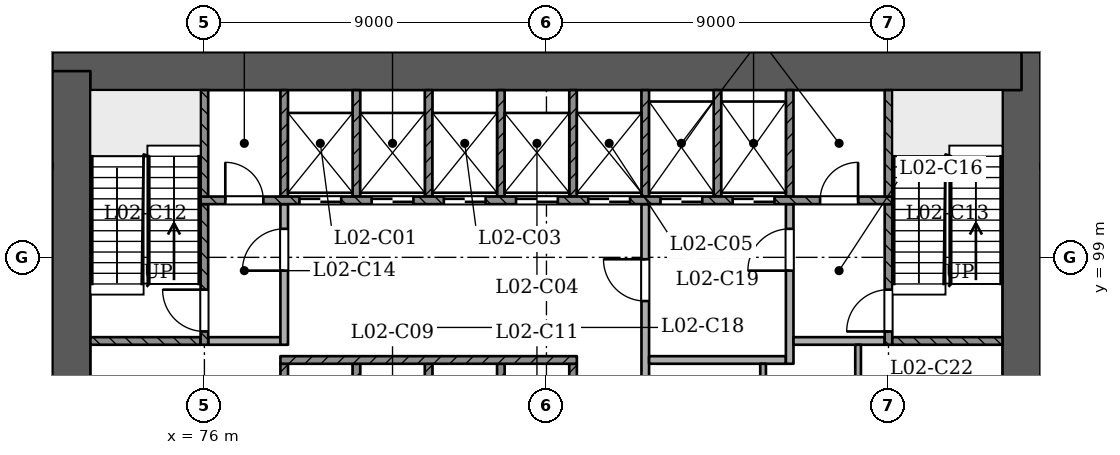
"""IFC4 building model, lengths in metres.
Left out: names, types, materials, properties, quantities, classifications, styles, units other than length and angle.
Written with IfcOpenShell. Run it as: python <this file> out.ifc"""

import sys

from ifc_helpers import new_model, si_unit, direction, frame, frame_2d, origin, place, context, subcontext, project, spatial, rectangle, extrude, element, fill, save


model = new_model("IFC4")
c1 = context("Model", 3, precision=1e-05, world=origin(), true_north=direction((0.0, 1.0)))
c2 = subcontext(c1, "Body", "Model", "MODEL_VIEW")
j1 = project(units=[si_unit("LENGTHUNIT", "METRE"), si_unit("PLANEANGLEUNIT", "RADIAN")], contexts=[c1])
p1 = place(None, origin())
s1 = spatial("IfcSite", under=j1, at=p1, CompositionType="ELEMENT")
p2 = place(p1, origin())
s2 = spatial("IfcBuilding", under=s1, at=p2, CompositionType="ELEMENT")
p3 = place(p2, frame((0.0, 0.0, 13.5)))
s3 = spatial("IfcBuildingStorey", under=s2, at=p3, CompositionType="ELEMENT", Elevation=13.5)
p4 = place(p3, frame((97.5, 92.9, 0.0), z_axis=(0.0, 0.0, 1.0), x_axis=(0.0, 1.0, 0.0)))
e1 = element("IfcWall", 1, at=p4, inside=s3, PredefinedType="SHEAR", context=c2, shape_type="SweptSolid", body=[
    extrude(rectangle(XDim=11.5, YDim=1.0, at=frame_2d((5.75, 0.0))), origin(), (0.0, 0.0, 1.0), 4.5),
])
p5 = place(p3, frame((97.5, 103.9, 0.0), z_axis=(0.0, 0.0, 1.0), x_axis=(-1.0, 0.0, 0.0)))
e2 = element("IfcWall", 2, at=p5, inside=s3, PredefinedType="SHEAR", context=c2, shape_type="SweptSolid", body=[
    extrude(rectangle(XDim=25.5, YDim=1.0, at=frame_2d((12.75, 0.0))), origin(), (0.0, 0.0, 1.0), 4.5),
])
p6 = place(p3, frame((72.5, 103.9, 0.0), z_axis=(0.0, 0.0, 1.0), x_axis=(0.0, -1.0, 0.0)))
e3 = element("IfcWall", 3, at=p6, inside=s3, PredefinedType="SHEAR", context=c2, shape_type="SweptSolid", body=[
    extrude(rectangle(XDim=11.5, YDim=1.0, at=frame_2d((5.75, 0.0))), origin(), (0.0, 0.0, 1.0), 4.5),
])
for number, where, z_axis, x_axis in (
    (4, (78.1, 93.4, 0.0), (0.0, 0.0, 1.0), (0.0, 1.0, 0.0)),
    (5, (80.0, 93.4, 0.0), (0.0, 0.0, 1.0), (0.0, 1.0, 0.0)),
    (6, (81.9, 93.4, 0.0), (0.0, 0.0, 1.0), (0.0, 1.0, 0.0)),
    (7, (83.8, 93.4, 0.0), (0.0, 0.0, 1.0), (0.0, 1.0, 0.0)),
    (8, (85.7, 93.4, 0.0), (0.0, 0.0, 1.0), (0.0, 1.0, 0.0)),
):
    element("IfcWall", number, at=place(p3, frame(where, z_axis=z_axis, x_axis=x_axis)), inside=s3, PredefinedType="SOLIDWALL", context=c2, shape_type="SweptSolid", body=[
        extrude(rectangle(XDim=2.8, YDim=0.2, at=frame_2d((1.4, 0.0))), origin(), (0.0, 0.0, 1.0), 4.05),
    ])
p7 = place(p3, frame((87.6, 93.4, 0.0), z_axis=(0.0, 0.0, 1.0), x_axis=(0.0, 1.0, 0.0)))
e9 = element("IfcWall", 9, at=p7, inside=s3, PredefinedType="PARTITIONING", context=c2, shape_type="SweptSolid", body=[
    extrude(rectangle(XDim=7.0, YDim=0.2, at=frame_2d((3.5, 0.0))), origin(), (0.0, 0.0, 1.0), 4.05),
])
p8 = place(p7, frame((4.45, 0.0, 0.0)))
e10 = element("IfcOpeningElement", 10, at=p8, cuts=e9, PredefinedType="OPENING", context=c2, shape_type="SweptSolid", body=[
    extrude(rectangle(XDim=1.1, YDim=2.1, at=frame_2d((0.55, 1.05))), frame((0.0, 0.11, 0.0), z_axis=(0.0, -1.0, 0.0), x_axis=(1.0, 0.0, 0.0)), (0.0, 0.0, 1.0), 0.221),
])
p9 = place(p3, frame((90.7, 93.4, 0.0), z_axis=(0.0, 0.0, 1.0), x_axis=(0.0, 1.0, 0.0)))
e11 = element("IfcWall", 11, at=p9, inside=s3, PredefinedType="PARTITIONING", context=c2, shape_type="SweptSolid", body=[
    extrude(rectangle(XDim=2.8, YDim=0.15, at=frame_2d((1.4, 0.0))), origin(), (0.0, 0.0, 1.0), 4.05),
])
p10 = place(p3, frame((93.2, 93.4, 0.0), z_axis=(0.0, 0.0, 1.0), x_axis=(0.0, 1.0, 0.0)))
e12 = element("IfcWall", 12, at=p10, inside=s3, PredefinedType="PARTITIONING", context=c2, shape_type="SweptSolid", body=[
    extrude(rectangle(XDim=3.3, YDim=0.15, at=frame_2d((1.65, 0.0))), origin(), (0.0, 0.0, 1.0), 4.05),
])
p11 = place(p3, frame((78.0, 96.3, 0.0), z_axis=(0.0, 0.0, 1.0), x_axis=(1.0, 0.0, 0.0)))
e13 = element("IfcWall", 13, at=p11, inside=s3, PredefinedType="SOLIDWALL", context=c2, shape_type="SweptSolid", body=[
    extrude(rectangle(XDim=7.8, YDim=0.2, at=frame_2d((3.9, 0.0))), origin(), (0.0, 0.0, 1.0), 4.05),
])
p12 = place(p3, frame((87.7, 96.3, 0.0), z_axis=(0.0, 0.0, 1.0), x_axis=(1.0, 0.0, 0.0)))
e14 = element("IfcWall", 14, at=p12, inside=s3, PredefinedType="PARTITIONING", context=c2, shape_type="SweptSolid", body=[
    extrude(rectangle(XDim=3.6, YDim=0.2, at=frame_2d((1.8, 0.0))), origin(), (0.0, 0.0, 1.0), 4.05),
])
p13 = place(p3, frame((91.4, 96.2, 0.0), z_axis=(0.0, 0.0, 1.0), x_axis=(0.0, 1.0, 0.0)))
e15 = element("IfcWall", 15, at=p13, inside=s3, PredefinedType="PARTITIONING", context=c2, shape_type="SweptSolid", body=[
    extrude(rectangle(XDim=4.2, YDim=0.2, at=frame_2d((2.1, 0.0))), origin(), (0.0, 0.0, 1.0), 4.05),
])
p14 = place(p13, frame((2.45, 0.0, 0.0)))
e16 = element("IfcOpeningElement", 16, at=p14, cuts=e15, PredefinedType="OPENING", context=c2, shape_type="SweptSolid", body=[
    extrude(rectangle(XDim=1.1, YDim=2.1, at=frame_2d((0.55, 1.05))), frame((0.0, 0.11, 0.0), z_axis=(0.0, -1.0, 0.0), x_axis=(1.0, 0.0, 0.0)), (0.0, 0.0, 1.0), 0.221),
])
p15 = place(p3, frame((73.0, 96.8, 0.0), z_axis=(0.0, 0.0, 1.0), x_axis=(1.0, 0.0, 0.0)))
e17 = element("IfcWall", 17, at=p15, inside=s3, PredefinedType="SOLIDWALL", context=c2, shape_type="SweptSolid", body=[
    extrude(rectangle(XDim=2.9, YDim=0.2, at=frame_2d((1.45, 0.0))), origin(), (0.0, 0.0, 1.0), 4.05),
])
p16 = place(p3, frame((76.0, 96.7, 0.0), z_axis=(0.0, 0.0, 1.0), x_axis=(0.0, 1.0, 0.0)))
e18 = element("IfcWall", 18, at=p16, inside=s3, PredefinedType="SOLIDWALL", context=c2, shape_type="SweptSolid", body=[
    extrude(rectangle(XDim=3.7, YDim=0.2, at=frame_2d((1.85, 0.0))), origin(), (0.0, 0.0, 1.0), 4.05),
])
p17 = place(p16, frame((0.35, 0.0, 0.0)))
e19 = element("IfcOpeningElement", 19, at=p17, cuts=e18, PredefinedType="OPENING", context=c2, shape_type="SweptSolid", body=[
    extrude(rectangle(XDim=1.1, YDim=2.1, at=frame_2d((0.55, 1.05))), frame((0.0, 0.11, 0.0), z_axis=(0.0, -1.0, 0.0), x_axis=(1.0, 0.0, 0.0)), (0.0, 0.0, 1.0), 0.221),
])
p18 = place(p3, frame((76.1, 96.8, 0.0), z_axis=(0.0, 0.0, 1.0), x_axis=(1.0, 0.0, 0.0)))
e20 = element("IfcWall", 20, at=p18, inside=s3, PredefinedType="PARTITIONING", context=c2, shape_type="SweptSolid", body=[
    extrude(rectangle(XDim=1.9, YDim=0.2, at=frame_2d((0.95, 0.0))), origin(), (0.0, 0.0, 1.0), 4.05),
])
p19 = place(p3, frame((78.1, 96.7, 0.0), z_axis=(0.0, 0.0, 1.0), x_axis=(0.0, 1.0, 0.0)))
e21 = element("IfcWall", 21, at=p19, inside=s3, PredefinedType="PARTITIONING", context=c2, shape_type="SweptSolid", body=[
    extrude(rectangle(XDim=3.7, YDim=0.2, at=frame_2d((1.85, 0.0))), origin(), (0.0, 0.0, 1.0), 4.05),
])
p20 = place(p19, frame((1.95, 0.0, 0.0)))
e22 = element("IfcOpeningElement", 22, at=p20, cuts=e21, PredefinedType="OPENING", context=c2, shape_type="SweptSolid", body=[
    extrude(rectangle(XDim=1.1, YDim=2.1, at=frame_2d((0.55, 1.05))), frame((0.0, 0.11, 0.0), z_axis=(0.0, -1.0, 0.0), x_axis=(1.0, 0.0, 0.0)), (0.0, 0.0, 1.0), 0.221),
])
p21 = place(p3, frame((91.5, 96.8, 0.0), z_axis=(0.0, 0.0, 1.0), x_axis=(1.0, 0.0, 0.0)))
e23 = element("IfcWall", 23, at=p21, inside=s3, PredefinedType="PARTITIONING", context=c2, shape_type="SweptSolid", body=[
    extrude(rectangle(XDim=2.4, YDim=0.2, at=frame_2d((1.2, 0.0))), origin(), (0.0, 0.0, 1.0), 4.05),
])
p22 = place(p3, frame((94.0, 96.7, 0.0), z_axis=(0.0, 0.0, 1.0), x_axis=(0.0, 1.0, 0.0)))
e24 = element("IfcWall", 24, at=p22, inside=s3, PredefinedType="SOLIDWALL", context=c2, shape_type="SweptSolid", body=[
    extrude(rectangle(XDim=3.7, YDim=0.2, at=frame_2d((1.85, 0.0))), origin(), (0.0, 0.0, 1.0), 4.05),
])
p23 = place(p22, frame((0.35, 0.0, 0.0)))
e25 = element("IfcOpeningElement", 25, at=p23, cuts=e24, PredefinedType="OPENING", context=c2, shape_type="SweptSolid", body=[
    extrude(rectangle(XDim=1.1, YDim=2.1, at=frame_2d((0.55, 1.05))), frame((0.0, 0.11, 0.0), z_axis=(0.0, -1.0, 0.0), x_axis=(1.0, 0.0, 0.0)), (0.0, 0.0, 1.0), 0.221),
])
p24 = place(p3, frame((94.1, 96.8, 0.0), z_axis=(0.0, 0.0, 1.0), x_axis=(1.0, 0.0, 0.0)))
e26 = element("IfcWall", 26, at=p24, inside=s3, PredefinedType="SOLIDWALL", context=c2, shape_type="SweptSolid", body=[
    extrude(rectangle(XDim=2.9, YDim=0.2, at=frame_2d((1.45, 0.0))), origin(), (0.0, 0.0, 1.0), 4.05),
])
p25 = place(p3, frame((75.9, 100.5, 0.0), z_axis=(0.0, 0.0, 1.0), x_axis=(1.0, 0.0, 0.0)))
e27 = element("IfcWall", 27, at=p25, inside=s3, PredefinedType="SOLIDWALL", context=c2, shape_type="SweptSolid", body=[
    extrude(rectangle(XDim=18.2, YDim=0.2, at=frame_2d((9.1, 0.0))), origin(), (0.0, 0.0, 1.0), 4.05),
])
p26 = place(p25, frame((2.6, 0.0, 0.0)))
e28 = element("IfcOpeningElement", 28, at=p26, cuts=e27, PredefinedType="OPENING", context=c2, shape_type="SweptSolid", body=[
    extrude(rectangle(XDim=1.1, YDim=2.1, at=frame_2d((0.55, 1.05))), frame((0.0, 0.11, 0.0), z_axis=(0.0, -1.0, 0.0), x_axis=(1.0, 0.0, 0.0)), (0.0, 0.0, 1.0), 0.221),
])
p27 = place(p25, frame((4.5, 0.0, 0.0)))
e29 = element("IfcOpeningElement", 29, at=p27, cuts=e27, PredefinedType="OPENING", context=c2, shape_type="SweptSolid", body=[
    extrude(rectangle(XDim=1.1, YDim=2.1, at=frame_2d((0.55, 1.05))), frame((0.0, 0.11, 0.0), z_axis=(0.0, -1.0, 0.0), x_axis=(1.0, 0.0, 0.0)), (0.0, 0.0, 1.0), 0.221),
])
p28 = place(p25, frame((6.4, 0.0, 0.0)))
e30 = element("IfcOpeningElement", 30, at=p28, cuts=e27, PredefinedType="OPENING", context=c2, shape_type="SweptSolid", body=[
    extrude(rectangle(XDim=1.1, YDim=2.1, at=frame_2d((0.55, 1.05))), frame((0.0, 0.11, 0.0), z_axis=(0.0, -1.0, 0.0), x_axis=(1.0, 0.0, 0.0)), (0.0, 0.0, 1.0), 0.221),
])
p29 = place(p25, frame((8.3, 0.0, 0.0)))
e31 = element("IfcOpeningElement", 31, at=p29, cuts=e27, PredefinedType="OPENING", context=c2, shape_type="SweptSolid", body=[
    extrude(rectangle(XDim=1.1, YDim=2.1, at=frame_2d((0.55, 1.05))), frame((0.0, 0.11, 0.0), z_axis=(0.0, -1.0, 0.0), x_axis=(1.0, 0.0, 0.0)), (0.0, 0.0, 1.0), 0.221),
])
p30 = place(p25, frame((10.2, 0.0, 0.0)))
e32 = element("IfcOpeningElement", 32, at=p30, cuts=e27, PredefinedType="OPENING", context=c2, shape_type="SweptSolid", body=[
    extrude(rectangle(XDim=1.1, YDim=2.1, at=frame_2d((0.55, 1.05))), frame((0.0, 0.11, 0.0), z_axis=(0.0, -1.0, 0.0), x_axis=(1.0, 0.0, 0.0)), (0.0, 0.0, 1.0), 0.221),
])
p31 = place(p25, frame((12.1, 0.0, 0.0)))
e33 = element("IfcOpeningElement", 33, at=p31, cuts=e27, PredefinedType="OPENING", context=c2, shape_type="SweptSolid", body=[
    extrude(rectangle(XDim=1.1, YDim=2.1, at=frame_2d((0.55, 1.05))), frame((0.0, 0.11, 0.0), z_axis=(0.0, -1.0, 0.0), x_axis=(1.0, 0.0, 0.0)), (0.0, 0.0, 1.0), 0.221),
])
p32 = place(p25, frame((14.0, 0.0, 0.0)))
e34 = element("IfcOpeningElement", 34, at=p32, cuts=e27, PredefinedType="OPENING", context=c2, shape_type="SweptSolid", body=[
    extrude(rectangle(XDim=1.1, YDim=2.1, at=frame_2d((0.55, 1.05))), frame((0.0, 0.11, 0.0), z_axis=(0.0, -1.0, 0.0), x_axis=(1.0, 0.0, 0.0)), (0.0, 0.0, 1.0), 0.221),
])
p33 = place(p25, frame((0.65, 0.0, 0.0)))
e35 = element("IfcOpeningElement", 35, at=p33, cuts=e27, PredefinedType="OPENING", context=c2, shape_type="SweptSolid", body=[
    extrude(rectangle(XDim=1.0, YDim=2.1, at=frame_2d((0.5, 1.05))), frame((0.0, 0.11, 0.0), z_axis=(0.0, -1.0, 0.0), x_axis=(1.0, 0.0, 0.0)), (0.0, 0.0, 1.0), 0.221),
])
p34 = place(p25, frame((16.3, 0.0, 0.0)))
e36 = element("IfcOpeningElement", 36, at=p34, cuts=e27, PredefinedType="OPENING", context=c2, shape_type="SweptSolid", body=[
    extrude(rectangle(XDim=1.0, YDim=2.1, at=frame_2d((0.5, 1.05))), frame((0.0, 0.11, 0.0), z_axis=(0.0, -1.0, 0.0), x_axis=(1.0, 0.0, 0.0)), (0.0, 0.0, 1.0), 0.221),
])
for number, where, z_axis, x_axis in (
    (37, (76.0, 100.6, 0.0), (0.0, 0.0, 1.0), (0.0, 1.0, 0.0)),
    (38, (78.1, 100.6, 0.0), (0.0, 0.0, 1.0), (0.0, 1.0, 0.0)),
    (39, (80.0, 100.6, 0.0), (0.0, 0.0, 1.0), (0.0, 1.0, 0.0)),
    (40, (81.9, 100.6, 0.0), (0.0, 0.0, 1.0), (0.0, 1.0, 0.0)),
    (41, (83.8, 100.6, 0.0), (0.0, 0.0, 1.0), (0.0, 1.0, 0.0)),
    (42, (85.7, 100.6, 0.0), (0.0, 0.0, 1.0), (0.0, 1.0, 0.0)),
    (43, (87.6, 100.6, 0.0), (0.0, 0.0, 1.0), (0.0, 1.0, 0.0)),
    (44, (89.5, 100.6, 0.0), (0.0, 0.0, 1.0), (0.0, 1.0, 0.0)),
    (45, (91.4, 100.6, 0.0), (0.0, 0.0, 1.0), (0.0, 1.0, 0.0)),
    (46, (94.0, 100.6, 0.0), (0.0, 0.0, 1.0), (0.0, 1.0, 0.0)),
):
    element("IfcWall", number, at=place(p3, frame(where, z_axis=z_axis, x_axis=x_axis)), inside=s3, PredefinedType="SOLIDWALL", context=c2, shape_type="SweptSolid", body=[
        extrude(rectangle(XDim=2.8, YDim=0.2, at=frame_2d((1.4, 0.0))), origin(), (0.0, 0.0, 1.0), 4.05),
    ])
p35 = place(p26, origin())
e47 = element("IfcDoor", 47, at=p35, inside=s3, OperationType="SLIDING_TO_RIGHT", PredefinedType="NOTDEFINED", context=c2, shape_type="SweptSolid", body=[
    extrude(rectangle(XDim=1.1, YDim=2.1, at=frame_2d((0.55, 1.05))), frame((0.0, 0.025, 0.0), z_axis=(0.0, -1.0, 0.0), x_axis=(1.0, 0.0, 0.0)), (0.0, 0.0, 1.0), 0.05),
])
fill(e28, e47)
p36 = place(p27, origin())
e48 = element("IfcDoor", 48, at=p36, inside=s3, OperationType="SLIDING_TO_LEFT", PredefinedType="NOTDEFINED", context=c2, shape_type="SweptSolid", body=[
    extrude(rectangle(XDim=1.1, YDim=2.1, at=frame_2d((0.55, 1.05))), frame((0.0, 0.025, 0.0), z_axis=(0.0, -1.0, 0.0), x_axis=(1.0, 0.0, 0.0)), (0.0, 0.0, 1.0), 0.05),
])
fill(e29, e48)
p37 = place(p28, origin())
e49 = element("IfcDoor", 49, at=p37, inside=s3, OperationType="SLIDING_TO_RIGHT", PredefinedType="NOTDEFINED", context=c2, shape_type="SweptSolid", body=[
    extrude(rectangle(XDim=1.1, YDim=2.1, at=frame_2d((0.55, 1.05))), frame((0.0, 0.025, 0.0), z_axis=(0.0, -1.0, 0.0), x_axis=(1.0, 0.0, 0.0)), (0.0, 0.0, 1.0), 0.05),
])
fill(e30, e49)
p38 = place(p29, origin())
e50 = element("IfcDoor", 50, at=p38, inside=s3, OperationType="SLIDING_TO_LEFT", PredefinedType="NOTDEFINED", context=c2, shape_type="SweptSolid", body=[
    extrude(rectangle(XDim=1.1, YDim=2.1, at=frame_2d((0.55, 1.05))), frame((0.0, 0.025, 0.0), z_axis=(0.0, -1.0, 0.0), x_axis=(1.0, 0.0, 0.0)), (0.0, 0.0, 1.0), 0.05),
])
fill(e31, e50)
p39 = place(p30, origin())
e51 = element("IfcDoor", 51, at=p39, inside=s3, OperationType="SLIDING_TO_RIGHT", PredefinedType="NOTDEFINED", context=c2, shape_type="SweptSolid", body=[
    extrude(rectangle(XDim=1.1, YDim=2.1, at=frame_2d((0.55, 1.05))), frame((0.0, 0.025, 0.0), z_axis=(0.0, -1.0, 0.0), x_axis=(1.0, 0.0, 0.0)), (0.0, 0.0, 1.0), 0.05),
])
fill(e32, e51)
p40 = place(p31, origin())
e52 = element("IfcDoor", 52, at=p40, inside=s3, OperationType="SLIDING_TO_RIGHT", PredefinedType="NOTDEFINED", context=c2, shape_type="SweptSolid", body=[
    extrude(rectangle(XDim=1.1, YDim=2.1, at=frame_2d((0.55, 1.05))), frame((0.0, 0.025, 0.0), z_axis=(0.0, -1.0, 0.0), x_axis=(1.0, 0.0, 0.0)), (0.0, 0.0, 1.0), 0.05),
])
fill(e33, e52)
p41 = place(p32, origin())
e53 = element("IfcDoor", 53, at=p41, inside=s3, OperationType="SLIDING_TO_LEFT", PredefinedType="NOTDEFINED", context=c2, shape_type="SweptSolid", body=[
    extrude(rectangle(XDim=1.1, YDim=2.1, at=frame_2d((0.55, 1.05))), frame((0.0, 0.025, 0.0), z_axis=(0.0, -1.0, 0.0), x_axis=(1.0, 0.0, 0.0)), (0.0, 0.0, 1.0), 0.05),
])
fill(e34, e53)
p42 = place(p17, origin())
e54 = element("IfcDoor", 54, at=p42, inside=s3, OperationType="SINGLE_SWING_RIGHT", PredefinedType="NOTDEFINED", context=c2, shape_type="SweptSolid", body=[
    extrude(rectangle(XDim=1.1, YDim=2.1, at=frame_2d((0.55, 1.05))), frame((0.0, 0.025, 0.0), z_axis=(0.0, -1.0, 0.0), x_axis=(1.0, 0.0, 0.0)), (0.0, 0.0, 1.0), 0.05),
])
fill(e19, e54)
p43 = place(p23, origin())
e55 = element("IfcDoor", 55, at=p43, inside=s3, OperationType="SINGLE_SWING_LEFT", PredefinedType="NOTDEFINED", context=c2, shape_type="SweptSolid", body=[
    extrude(rectangle(XDim=1.1, YDim=2.1, at=frame_2d((0.55, 1.05))), frame((0.0, 0.025, 0.0), z_axis=(0.0, -1.0, 0.0), x_axis=(1.0, 0.0, 0.0)), (0.0, 0.0, 1.0), 0.05),
])
fill(e25, e55)
p44 = place(p20, origin())
e56 = element("IfcDoor", 56, at=p44, inside=s3, OperationType="SINGLE_SWING_LEFT", PredefinedType="NOTDEFINED", context=c2, shape_type="SweptSolid", body=[
    extrude(rectangle(XDim=1.1, YDim=2.1, at=frame_2d((0.55, 1.05))), frame((0.0, 0.025, 0.0), z_axis=(0.0, -1.0, 0.0), x_axis=(1.0, 0.0, 0.0)), (0.0, 0.0, 1.0), 0.05),
])
fill(e22, e56)
p45 = place(p8, origin())
e57 = element("IfcDoor", 57, at=p45, inside=s3, OperationType="SINGLE_SWING_RIGHT", PredefinedType="NOTDEFINED", context=c2, shape_type="SweptSolid", body=[
    extrude(rectangle(XDim=1.1, YDim=2.1, at=frame_2d((0.55, 1.05))), frame((0.0, 0.025, 0.0), z_axis=(0.0, -1.0, 0.0), x_axis=(1.0, 0.0, 0.0)), (0.0, 0.0, 1.0), 0.05),
])
fill(e10, e57)
p46 = place(p14, origin())
e58 = element("IfcDoor", 58, at=p46, inside=s3, OperationType="SINGLE_SWING_LEFT", PredefinedType="NOTDEFINED", context=c2, shape_type="SweptSolid", body=[
    extrude(rectangle(XDim=1.1, YDim=2.1, at=frame_2d((0.55, 1.05))), frame((0.0, 0.025, 0.0), z_axis=(0.0, -1.0, 0.0), x_axis=(1.0, 0.0, 0.0)), (0.0, 0.0, 1.0), 0.05),
])
fill(e16, e58)
p47 = place(p33, origin())
e59 = element("IfcDoor", 59, at=p47, inside=s3, OperationType="SINGLE_SWING_LEFT", PredefinedType="NOTDEFINED", context=c2, shape_type="SweptSolid", body=[
    extrude(rectangle(XDim=1.0, YDim=2.1, at=frame_2d((0.5, 1.05))), frame((0.0, 0.025, 0.0), z_axis=(0.0, -1.0, 0.0), x_axis=(1.0, 0.0, 0.0)), (0.0, 0.0, 1.0), 0.05),
])
fill(e35, e59)
p48 = place(p34, origin())
e60 = element("IfcDoor", 60, at=p48, inside=s3, OperationType="SINGLE_SWING_RIGHT", PredefinedType="NOTDEFINED", context=c2, shape_type="SweptSolid", body=[
    extrude(rectangle(XDim=1.0, YDim=2.1, at=frame_2d((0.5, 1.05))), frame((0.0, 0.025, 0.0), z_axis=(0.0, -1.0, 0.0), x_axis=(1.0, 0.0, 0.0)), (0.0, 0.0, 1.0), 0.05),
])
fill(e36, e60)
save(model, sys.argv[1])
